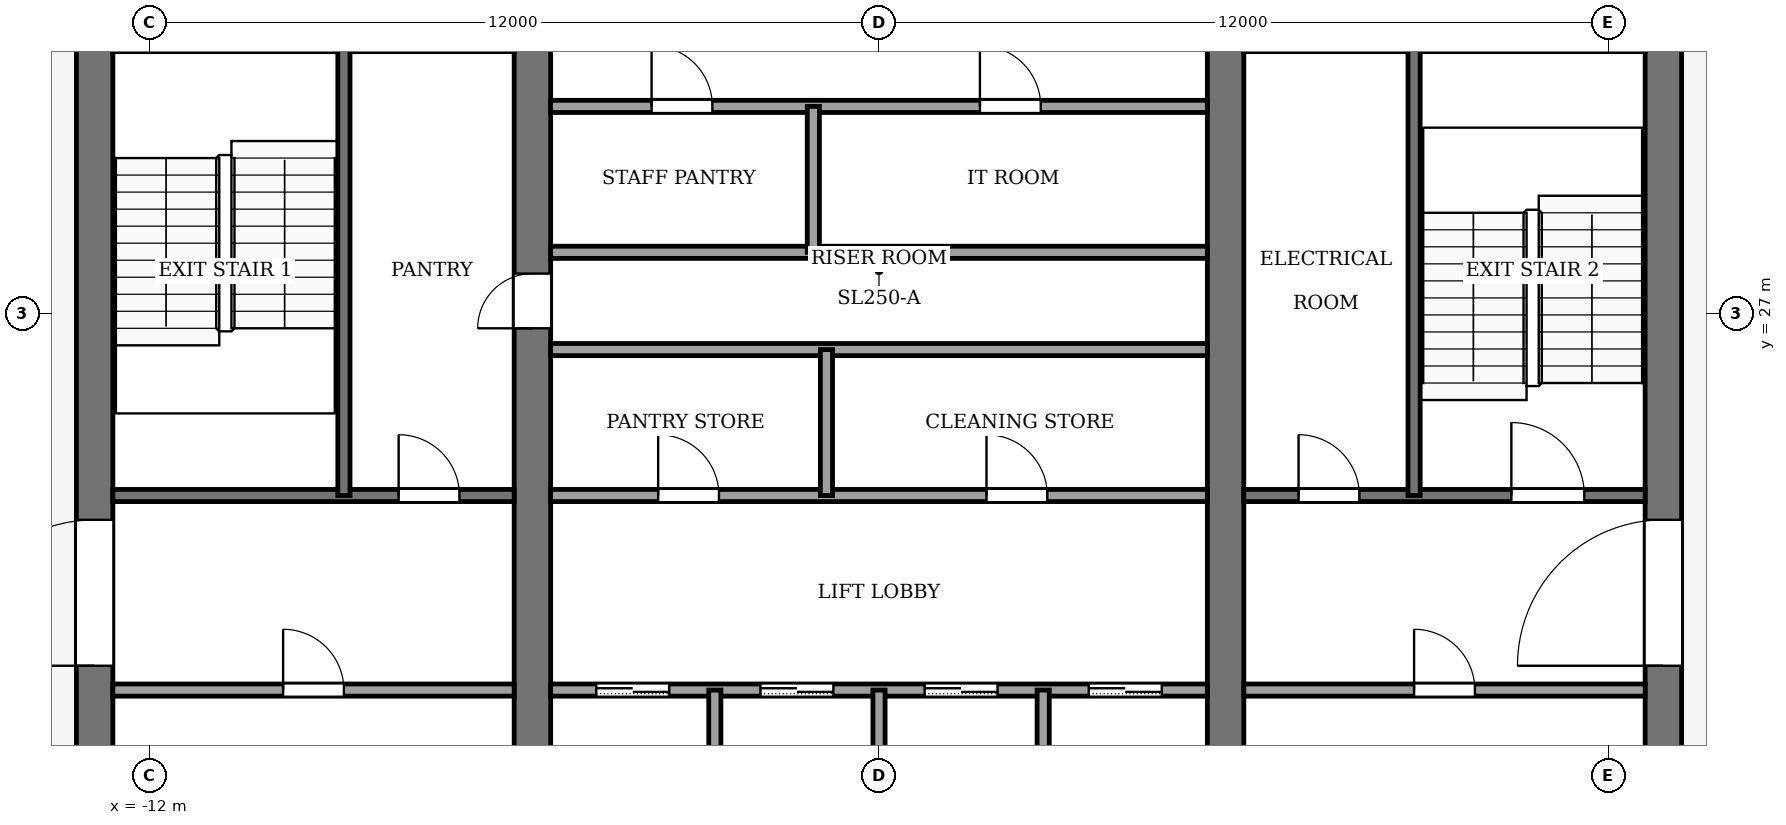
"""IFC4 building model, lengths in metres.
Left out: names, types, materials, properties, quantities, classifications, styles, units other than length and angle.
Written with IfcOpenShell. Run it as: python <this file> out.ifc"""

import sys

from ifc_helpers import new_model, si_unit, direction, frame, frame_2d, origin, place, context, subcontext, project, spatial, rectangle, extrude, element, fill, save


model = new_model("IFC4")
c1 = context("Model", 3, precision=1e-05, world=origin(), true_north=direction((0.0, 1.0)))
c2 = subcontext(c1, "Body", "Model", "MODEL_VIEW")
j1 = project(units=[si_unit("LENGTHUNIT", "METRE"), si_unit("PLANEANGLEUNIT", "RADIAN")], contexts=[c1])
p1 = place(None, origin())
s1 = spatial("IfcSite", under=j1, at=p1, CompositionType="ELEMENT")
p2 = place(p1, origin())
s2 = spatial("IfcBuilding", under=s1, at=p2, CompositionType="ELEMENT")
p3 = place(p2, frame((0.0, 0.0, 306.0)))
s3 = spatial("IfcBuildingStorey", under=s2, at=p3, CompositionType="ELEMENT", Elevation=306.0)
p4 = place(p3, frame((-12.9, 18.4, -0.13), z_axis=(0.0, 0.0, 1.0), x_axis=(0.0, 1.0, 0.0)))
e1 = element("IfcWall", 1, at=p4, inside=s3, PredefinedType="SHEAR", context=c2, shape_type="SweptSolid", body=[
    extrude(rectangle(XDim=19.2, YDim=0.6, at=frame_2d((9.6, 0.0))), origin(), (0.0, 0.0, 1.0), 4.0),
])
p5 = place(p4, frame((2.8, 0.0, 0.13)))
e2 = element("IfcOpeningElement", 2, at=p5, cuts=e1, PredefinedType="OPENING", context=c2, shape_type="SweptSolid", body=[
    extrude(rectangle(XDim=2.4, YDim=2.4, at=frame_2d((1.2, 1.2))), frame((0.0, 0.31, 0.0), z_axis=(0.0, -1.0, 0.0), x_axis=(1.0, 0.0, 0.0)), (0.0, 0.0, 1.0), 0.62),
])
p6 = place(p4, frame((13.4, 0.0, 0.13)))
e3 = element("IfcOpeningElement", 3, at=p6, cuts=e1, PredefinedType="OPENING", context=c2, shape_type="SweptSolid", body=[
    extrude(rectangle(XDim=1.4, YDim=2.2, at=frame_2d((0.7, 1.1))), frame((0.0, 0.31, 0.0), z_axis=(0.0, -1.0, 0.0), x_axis=(1.0, 0.0, 0.0)), (0.0, 0.0, 1.0), 0.62),
])
p7 = place(p3, frame((12.9, 18.4, -0.13), z_axis=(0.0, 0.0, 1.0), x_axis=(0.0, 1.0, 0.0)))
e4 = element("IfcWall", 4, at=p7, inside=s3, PredefinedType="SHEAR", context=c2, shape_type="SweptSolid", body=[
    extrude(rectangle(XDim=19.2, YDim=0.6, at=frame_2d((9.6, 0.0))), origin(), (0.0, 0.0, 1.0), 4.0),
])
p8 = place(p7, frame((2.8, 0.0, 0.13)))
e5 = element("IfcOpeningElement", 5, at=p8, cuts=e4, PredefinedType="OPENING", context=c2, shape_type="SweptSolid", body=[
    extrude(rectangle(XDim=2.4, YDim=2.4, at=frame_2d((1.2, 1.2))), frame((0.0, 0.31, 0.0), z_axis=(0.0, -1.0, 0.0), x_axis=(1.0, 0.0, 0.0)), (0.0, 0.0, 1.0), 0.62),
])
p9 = place(p7, frame((13.3, 0.0, 0.13)))
e6 = element("IfcOpeningElement", 6, at=p9, cuts=e4, PredefinedType="OPENING", context=c2, shape_type="SweptSolid", body=[
    extrude(rectangle(XDim=2.4, YDim=2.4, at=frame_2d((1.2, 1.2))), frame((0.0, 0.31, 0.0), z_axis=(0.0, -1.0, 0.0), x_axis=(1.0, 0.0, 0.0)), (0.0, 0.0, 1.0), 0.62),
])
p10 = place(p3, frame((-5.7, 18.4, -0.13), z_axis=(0.0, 0.0, 1.0), x_axis=(0.0, 1.0, 0.0)))
e7 = element("IfcWall", 7, at=p10, inside=s3, PredefinedType="SHEAR", context=c2, shape_type="SweptSolid", body=[
    extrude(rectangle(XDim=19.2, YDim=0.6, at=frame_2d((9.6, 0.0))), origin(), (0.0, 0.0, 1.0), 4.0),
])
p11 = place(p10, frame((8.35, 0.0, 0.13)))
e8 = element("IfcOpeningElement", 8, at=p11, cuts=e7, PredefinedType="OPENING", context=c2, shape_type="SweptSolid", body=[
    extrude(rectangle(XDim=0.9, YDim=2.1, at=frame_2d((0.45, 1.05))), frame((0.0, 0.31, 0.0), z_axis=(0.0, -1.0, 0.0), x_axis=(1.0, 0.0, 0.0)), (0.0, 0.0, 1.0), 0.62),
])
p12 = place(p3, frame((5.7, 18.4, -0.13), z_axis=(0.0, 0.0, 1.0), x_axis=(0.0, 1.0, 0.0)))
e9 = element("IfcWall", 9, at=p12, inside=s3, PredefinedType="SHEAR", context=c2, shape_type="SweptSolid", body=[
    extrude(rectangle(XDim=19.2, YDim=0.6, at=frame_2d((9.6, 0.0))), origin(), (0.0, 0.0, 1.0), 4.0),
])
p13 = place(p12, frame((13.3, 0.0, 0.13)))
e10 = element("IfcOpeningElement", 10, at=p13, cuts=e9, PredefinedType="OPENING", context=c2, shape_type="SweptSolid", body=[
    extrude(rectangle(XDim=2.4, YDim=2.4, at=frame_2d((1.2, 1.2))), frame((0.0, 0.31, 0.0), z_axis=(0.0, -1.0, 0.0), x_axis=(1.0, 0.0, 0.0)), (0.0, 0.0, 1.0), 0.62),
])
p14 = place(p3, frame((-12.6, 20.8, 0.0), z_axis=(0.0, 0.0, 1.0), x_axis=(1.0, 0.0, 0.0)))
e11 = element("IfcWall", 11, at=p14, inside=s3, PredefinedType="PARTITIONING", context=c2, shape_type="SweptSolid", body=[
    extrude(rectangle(XDim=6.6, YDim=0.2, at=frame_2d((3.3, 0.0))), origin(), (0.0, 0.0, 1.0), 3.87),
])
p15 = place(p14, frame((2.8, 0.0, 0.0)))
e12 = element("IfcOpeningElement", 12, at=p15, cuts=e11, PredefinedType="OPENING", context=c2, shape_type="SweptSolid", body=[
    extrude(rectangle(XDim=1.0, YDim=2.1, at=frame_2d((0.5, 1.05))), frame((0.0, 0.11, 0.0), z_axis=(0.0, -1.0, 0.0), x_axis=(1.0, 0.0, 0.0)), (0.0, 0.0, 1.0), 0.22),
])
p16 = place(p3, frame((-5.4, 20.8, 0.0), z_axis=(0.0, 0.0, 1.0), x_axis=(1.0, 0.0, 0.0)))
e13 = element("IfcWall", 13, at=p16, inside=s3, PredefinedType="PARTITIONING", context=c2, shape_type="SweptSolid", body=[
    extrude(rectangle(XDim=10.8, YDim=0.2, at=frame_2d((5.4, 0.0))), origin(), (0.0, 0.0, 1.0), 3.87),
])
p17 = place(p16, frame((0.75, 0.0, 0.0)))
e14 = element("IfcOpeningElement", 14, at=p17, cuts=e13, PredefinedType="OPENING", context=c2, shape_type="SweptSolid", body=[
    extrude(rectangle(XDim=1.2, YDim=2.2, at=frame_2d((0.6, 1.1))), frame((0.0, 0.11, 0.0), z_axis=(0.0, -1.0, 0.0), x_axis=(1.0, 0.0, 0.0)), (0.0, 0.0, 1.0), 0.22),
])
p18 = place(p16, frame((3.45, 0.0, 0.0)))
e15 = element("IfcOpeningElement", 15, at=p18, cuts=e13, PredefinedType="OPENING", context=c2, shape_type="SweptSolid", body=[
    extrude(rectangle(XDim=1.2, YDim=2.2, at=frame_2d((0.6, 1.1))), frame((0.0, 0.11, 0.0), z_axis=(0.0, -1.0, 0.0), x_axis=(1.0, 0.0, 0.0)), (0.0, 0.0, 1.0), 0.22),
])
p19 = place(p16, frame((6.15, 0.0, 0.0)))
e16 = element("IfcOpeningElement", 16, at=p19, cuts=e13, PredefinedType="OPENING", context=c2, shape_type="SweptSolid", body=[
    extrude(rectangle(XDim=1.2, YDim=2.2, at=frame_2d((0.6, 1.1))), frame((0.0, 0.11, 0.0), z_axis=(0.0, -1.0, 0.0), x_axis=(1.0, 0.0, 0.0)), (0.0, 0.0, 1.0), 0.22),
])
p20 = place(p16, frame((8.85, 0.0, 0.0)))
e17 = element("IfcOpeningElement", 17, at=p20, cuts=e13, PredefinedType="OPENING", context=c2, shape_type="SweptSolid", body=[
    extrude(rectangle(XDim=1.2, YDim=2.2, at=frame_2d((0.6, 1.1))), frame((0.0, 0.11, 0.0), z_axis=(0.0, -1.0, 0.0), x_axis=(1.0, 0.0, 0.0)), (0.0, 0.0, 1.0), 0.22),
])
p21 = place(p3, frame((6.0, 20.8, 0.0), z_axis=(0.0, 0.0, 1.0), x_axis=(1.0, 0.0, 0.0)))
e18 = element("IfcWall", 18, at=p21, inside=s3, PredefinedType="PARTITIONING", context=c2, shape_type="SweptSolid", body=[
    extrude(rectangle(XDim=6.6, YDim=0.2, at=frame_2d((3.3, 0.0))), origin(), (0.0, 0.0, 1.0), 3.87),
])
p22 = place(p21, frame((2.8, 0.0, 0.0)))
e19 = element("IfcOpeningElement", 19, at=p22, cuts=e18, PredefinedType="OPENING", context=c2, shape_type="SweptSolid", body=[
    extrude(rectangle(XDim=1.0, YDim=2.1, at=frame_2d((0.5, 1.05))), frame((0.0, 0.11, 0.0), z_axis=(0.0, -1.0, 0.0), x_axis=(1.0, 0.0, 0.0)), (0.0, 0.0, 1.0), 0.22),
])
p23 = place(p3, frame((-12.6, 24.0, 0.0), z_axis=(0.0, 0.0, 1.0), x_axis=(1.0, 0.0, 0.0)))
e20 = element("IfcWall", 20, at=p23, inside=s3, PredefinedType="PARTITIONING", context=c2, shape_type="SweptSolid", body=[
    extrude(rectangle(XDim=6.6, YDim=0.2, at=frame_2d((3.3, 0.0))), origin(), (0.0, 0.0, 1.0), 3.87),
])
p24 = place(p23, frame((4.7, 0.0, 0.0)))
e21 = element("IfcOpeningElement", 21, at=p24, cuts=e20, PredefinedType="OPENING", context=c2, shape_type="SweptSolid", body=[
    extrude(rectangle(XDim=1.0, YDim=2.1, at=frame_2d((0.5, 1.05))), frame((0.0, 0.11, 0.0), z_axis=(0.0, -1.0, 0.0), x_axis=(1.0, 0.0, 0.0)), (0.0, 0.0, 1.0), 0.22),
])
p25 = place(p3, frame((-5.4, 24.0, 0.0), z_axis=(0.0, 0.0, 1.0), x_axis=(1.0, 0.0, 0.0)))
e22 = element("IfcWall", 22, at=p25, inside=s3, PredefinedType="PARTITIONING", context=c2, shape_type="SweptSolid", body=[
    extrude(rectangle(XDim=10.8, YDim=0.2, at=frame_2d((5.4, 0.0))), origin(), (0.0, 0.0, 1.0), 3.87),
])
p26 = place(p25, frame((1.768, 0.0, 0.0)))
e23 = element("IfcOpeningElement", 23, at=p26, cuts=e22, PredefinedType="OPENING", context=c2, shape_type="SweptSolid", body=[
    extrude(rectangle(XDim=1.0, YDim=2.1, at=frame_2d((0.5, 1.05))), frame((0.0, 0.11, 0.0), z_axis=(0.0, -1.0, 0.0), x_axis=(1.0, 0.0, 0.0)), (0.0, 0.0, 1.0), 0.22),
])
p27 = place(p25, frame((7.168, 0.0, 0.0)))
e24 = element("IfcOpeningElement", 24, at=p27, cuts=e22, PredefinedType="OPENING", context=c2, shape_type="SweptSolid", body=[
    extrude(rectangle(XDim=1.0, YDim=2.1, at=frame_2d((0.5, 1.05))), frame((0.0, 0.11, 0.0), z_axis=(0.0, -1.0, 0.0), x_axis=(1.0, 0.0, 0.0)), (0.0, 0.0, 1.0), 0.22),
])
p28 = place(p3, frame((6.0, 24.0, 0.0), z_axis=(0.0, 0.0, 1.0), x_axis=(1.0, 0.0, 0.0)))
e25 = element("IfcWall", 25, at=p28, inside=s3, PredefinedType="PARTITIONING", context=c2, shape_type="SweptSolid", body=[
    extrude(rectangle(XDim=6.6, YDim=0.2, at=frame_2d((3.3, 0.0))), origin(), (0.0, 0.0, 1.0), 3.87),
])
p29 = place(p28, frame((0.9, 0.0, 0.0)))
e26 = element("IfcOpeningElement", 26, at=p29, cuts=e25, PredefinedType="OPENING", context=c2, shape_type="SweptSolid", body=[
    extrude(rectangle(XDim=1.0, YDim=2.1, at=frame_2d((0.5, 1.05))), frame((0.0, 0.11, 0.0), z_axis=(0.0, -1.0, 0.0), x_axis=(1.0, 0.0, 0.0)), (0.0, 0.0, 1.0), 0.22),
])
p30 = place(p28, frame((4.4, 0.0, 0.0)))
e27 = element("IfcOpeningElement", 27, at=p30, cuts=e25, PredefinedType="OPENING", context=c2, shape_type="SweptSolid", body=[
    extrude(rectangle(XDim=1.2, YDim=2.2, at=frame_2d((0.6, 1.1))), frame((0.0, 0.11, 0.0), z_axis=(0.0, -1.0, 0.0), x_axis=(1.0, 0.0, 0.0)), (0.0, 0.0, 1.0), 0.22),
])
for number, where, z_axis, x_axis in (
    (28, (-5.4, 26.4, 0.0), (0.0, 0.0, 1.0), (1.0, 0.0, 0.0)),
    (29, (-5.4, 28.0, 0.0), (0.0, 0.0, 1.0), (1.0, 0.0, 0.0)),
):
    element("IfcWall", number, at=place(p3, frame(where, z_axis=z_axis, x_axis=x_axis)), inside=s3, PredefinedType="PARTITIONING", context=c2, shape_type="SweptSolid", body=[
        extrude(rectangle(XDim=10.8, YDim=0.2, at=frame_2d((5.4, 0.0))), origin(), (0.0, 0.0, 1.0), 3.87),
    ])
p31 = place(p3, frame((-5.4, 30.4, 0.0), z_axis=(0.0, 0.0, 1.0), x_axis=(1.0, 0.0, 0.0)))
e30 = element("IfcWall", 30, at=p31, inside=s3, PredefinedType="PARTITIONING", context=c2, shape_type="SweptSolid", body=[
    extrude(rectangle(XDim=10.8, YDim=0.2, at=frame_2d((5.4, 0.0))), origin(), (0.0, 0.0, 1.0), 3.87),
])
p32 = place(p31, frame((1.66, 0.0, 0.0)))
e31 = element("IfcOpeningElement", 31, at=p32, cuts=e30, PredefinedType="OPENING", context=c2, shape_type="SweptSolid", body=[
    extrude(rectangle(XDim=1.0, YDim=2.1, at=frame_2d((0.5, 1.05))), frame((0.0, 0.11, 0.0), z_axis=(0.0, -1.0, 0.0), x_axis=(1.0, 0.0, 0.0)), (0.0, 0.0, 1.0), 0.22),
])
p33 = place(p31, frame((7.06, 0.0, 0.0)))
e32 = element("IfcOpeningElement", 32, at=p33, cuts=e30, PredefinedType="OPENING", context=c2, shape_type="SweptSolid", body=[
    extrude(rectangle(XDim=1.0, YDim=2.1, at=frame_2d((0.5, 1.05))), frame((0.0, 0.11, 0.0), z_axis=(0.0, -1.0, 0.0), x_axis=(1.0, 0.0, 0.0)), (0.0, 0.0, 1.0), 0.22),
])
p34 = place(p3, frame((-12.6, 31.4, 0.0), z_axis=(0.0, 0.0, 1.0), x_axis=(1.0, 0.0, 0.0)))
e33 = element("IfcWall", 33, at=p34, inside=s3, PredefinedType="PARTITIONING", context=c2, shape_type="SweptSolid", body=[
    extrude(rectangle(XDim=6.6, YDim=0.2, at=frame_2d((3.3, 0.0))), origin(), (0.0, 0.0, 1.0), 3.87),
])
p35 = place(p34, frame((1.0, 0.0, 0.0)))
e34 = element("IfcOpeningElement", 34, at=p35, cuts=e33, PredefinedType="OPENING", context=c2, shape_type="SweptSolid", body=[
    extrude(rectangle(XDim=1.2, YDim=2.2, at=frame_2d((0.6, 1.1))), frame((0.0, 0.11, 0.0), z_axis=(0.0, -1.0, 0.0), x_axis=(1.0, 0.0, 0.0)), (0.0, 0.0, 1.0), 0.22),
])
p36 = place(p3, frame((6.0, 31.4, 0.0), z_axis=(0.0, 0.0, 1.0), x_axis=(1.0, 0.0, 0.0)))
e35 = element("IfcWall", 35, at=p36, inside=s3, PredefinedType="PARTITIONING", context=c2, shape_type="SweptSolid", body=[
    extrude(rectangle(XDim=6.6, YDim=0.2, at=frame_2d((3.3, 0.0))), origin(), (0.0, 0.0, 1.0), 3.87),
])
p37 = place(p3, frame((-8.8, 24.0, 0.0), z_axis=(0.0, 0.0, 1.0), x_axis=(0.0, 1.0, 0.0)))
e36 = element("IfcWall", 36, at=p37, inside=s3, PredefinedType="PARTITIONING", context=c2, shape_type="SweptSolid", body=[
    extrude(rectangle(XDim=7.4, YDim=0.2, at=frame_2d((3.7, 0.0))), origin(), (0.0, 0.0, 1.0), 3.87),
])
p38 = place(p3, frame((-2.7, 18.4, 0.0), z_axis=(0.0, 0.0, 1.0), x_axis=(0.0, 1.0, 0.0)))
e37 = element("IfcWall", 37, at=p38, inside=s3, PredefinedType="PARTITIONING", context=c2, shape_type="SweptSolid", body=[
    extrude(rectangle(XDim=2.4, YDim=0.2, at=frame_2d((1.2, 0.0))), origin(), (0.0, 0.0, 1.0), 3.87),
])
for number, where, z_axis, x_axis in (
    (38, (-1.08, 28.0, 0.0), (0.0, 0.0, 1.0), (0.0, 1.0, 0.0)),
    (39, (-0.864, 24.0, 0.0), (0.0, 0.0, 1.0), (0.0, 1.0, 0.0)),
):
    element("IfcWall", number, at=place(p3, frame(where, z_axis=z_axis, x_axis=x_axis)), inside=s3, PredefinedType="PARTITIONING", context=c2, shape_type="SweptSolid", body=[
        extrude(rectangle(XDim=2.4, YDim=0.2, at=frame_2d((1.2, 0.0))), origin(), (0.0, 0.0, 1.0), 3.87),
    ])
for number, where, z_axis, x_axis in (
    (40, (0.0, 18.4, 0.0), (0.0, 0.0, 1.0), (0.0, 1.0, 0.0)),
    (41, (2.7, 18.4, 0.0), (0.0, 0.0, 1.0), (0.0, 1.0, 0.0)),
):
    element("IfcWall", number, at=place(p3, frame(where, z_axis=z_axis, x_axis=x_axis)), inside=s3, PredefinedType="PARTITIONING", context=c2, shape_type="SweptSolid", body=[
        extrude(rectangle(XDim=2.4, YDim=0.2, at=frame_2d((1.2, 0.0))), origin(), (0.0, 0.0, 1.0), 3.87),
    ])
p39 = place(p3, frame((8.8, 24.0, 0.0), z_axis=(0.0, 0.0, 1.0), x_axis=(0.0, 1.0, 0.0)))
e42 = element("IfcWall", 42, at=p39, inside=s3, PredefinedType="PARTITIONING", context=c2, shape_type="SweptSolid", body=[
    extrude(rectangle(XDim=7.4, YDim=0.2, at=frame_2d((3.7, 0.0))), origin(), (0.0, 0.0, 1.0), 3.87),
])
p40 = place(p17, origin())
e43 = element("IfcDoor", 43, at=p40, inside=s3, OperationType="SLIDING_TO_LEFT", PredefinedType="DOOR", context=c2, shape_type="SweptSolid", body=[
    extrude(rectangle(XDim=1.2, YDim=2.2, at=frame_2d((0.6, 1.1))), frame((0.0, 0.025, 0.0), z_axis=(0.0, -1.0, 0.0), x_axis=(1.0, 0.0, 0.0)), (0.0, 0.0, 1.0), 0.05),
])
fill(e14, e43)
p41 = place(p18, origin())
e44 = element("IfcDoor", 44, at=p41, inside=s3, OperationType="SLIDING_TO_LEFT", PredefinedType="DOOR", context=c2, shape_type="SweptSolid", body=[
    extrude(rectangle(XDim=1.2, YDim=2.2, at=frame_2d((0.6, 1.1))), frame((0.0, 0.025, 0.0), z_axis=(0.0, -1.0, 0.0), x_axis=(1.0, 0.0, 0.0)), (0.0, 0.0, 1.0), 0.05),
])
fill(e15, e44)
p42 = place(p19, origin())
e45 = element("IfcDoor", 45, at=p42, inside=s3, OperationType="SLIDING_TO_LEFT", PredefinedType="DOOR", context=c2, shape_type="SweptSolid", body=[
    extrude(rectangle(XDim=1.2, YDim=2.2, at=frame_2d((0.6, 1.1))), frame((0.0, 0.025, 0.0), z_axis=(0.0, -1.0, 0.0), x_axis=(1.0, 0.0, 0.0)), (0.0, 0.0, 1.0), 0.05),
])
fill(e16, e45)
p43 = place(p20, origin())
e46 = element("IfcDoor", 46, at=p43, inside=s3, OperationType="SLIDING_TO_LEFT", PredefinedType="DOOR", context=c2, shape_type="SweptSolid", body=[
    extrude(rectangle(XDim=1.2, YDim=2.2, at=frame_2d((0.6, 1.1))), frame((0.0, 0.025, 0.0), z_axis=(0.0, -1.0, 0.0), x_axis=(1.0, 0.0, 0.0)), (0.0, 0.0, 1.0), 0.05),
])
fill(e17, e46)
p44 = place(p26, origin())
e47 = element("IfcDoor", 47, at=p44, inside=s3, OperationType="SINGLE_SWING_LEFT", PredefinedType="DOOR", context=c2, shape_type="SweptSolid", body=[
    extrude(rectangle(XDim=1.0, YDim=2.1, at=frame_2d((0.5, 1.05))), frame((0.0, 0.025, 0.0), z_axis=(0.0, -1.0, 0.0), x_axis=(1.0, 0.0, 0.0)), (0.0, 0.0, 1.0), 0.05),
])
fill(e23, e47)
p45 = place(p27, origin())
e48 = element("IfcDoor", 48, at=p45, inside=s3, OperationType="SINGLE_SWING_RIGHT", PredefinedType="DOOR", context=c2, shape_type="SweptSolid", body=[
    extrude(rectangle(XDim=1.0, YDim=2.1, at=frame_2d((0.5, 1.05))), frame((0.0, 0.025, 0.0), z_axis=(0.0, -1.0, 0.0), x_axis=(1.0, 0.0, 0.0)), (0.0, 0.0, 1.0), 0.05),
])
fill(e24, e48)
p46 = place(p32, origin())
e49 = element("IfcDoor", 49, at=p46, inside=s3, OperationType="SINGLE_SWING_RIGHT", PredefinedType="DOOR", context=c2, shape_type="SweptSolid", body=[
    extrude(rectangle(XDim=1.0, YDim=2.1, at=frame_2d((0.5, 1.05))), frame((0.0, 0.025, 0.0), z_axis=(0.0, -1.0, 0.0), x_axis=(1.0, 0.0, 0.0)), (0.0, 0.0, 1.0), 0.05),
])
fill(e31, e49)
p47 = place(p33, origin())
e50 = element("IfcDoor", 50, at=p47, inside=s3, OperationType="SINGLE_SWING_LEFT", PredefinedType="DOOR", context=c2, shape_type="SweptSolid", body=[
    extrude(rectangle(XDim=1.0, YDim=2.1, at=frame_2d((0.5, 1.05))), frame((0.0, 0.025, 0.0), z_axis=(0.0, -1.0, 0.0), x_axis=(1.0, 0.0, 0.0)), (0.0, 0.0, 1.0), 0.05),
])
fill(e32, e50)
p48 = place(p15, origin())
e51 = element("IfcDoor", 51, at=p48, inside=s3, OperationType="SINGLE_SWING_LEFT", PredefinedType="DOOR", context=c2, shape_type="SweptSolid", body=[
    extrude(rectangle(XDim=1.0, YDim=2.1, at=frame_2d((0.5, 1.05))), frame((0.0, 0.025, 0.0), z_axis=(0.0, -1.0, 0.0), x_axis=(1.0, 0.0, 0.0)), (0.0, 0.0, 1.0), 0.05),
])
fill(e12, e51)
p49 = place(p22, origin())
e52 = element("IfcDoor", 52, at=p49, inside=s3, OperationType="SINGLE_SWING_RIGHT", PredefinedType="DOOR", context=c2, shape_type="SweptSolid", body=[
    extrude(rectangle(XDim=1.0, YDim=2.1, at=frame_2d((0.5, 1.05))), frame((0.0, 0.025, 0.0), z_axis=(0.0, -1.0, 0.0), x_axis=(1.0, 0.0, 0.0)), (0.0, 0.0, 1.0), 0.05),
])
fill(e19, e52)
p50 = place(p24, origin())
e53 = element("IfcDoor", 53, at=p50, inside=s3, OperationType="SINGLE_SWING_RIGHT", PredefinedType="DOOR", context=c2, shape_type="SweptSolid", body=[
    extrude(rectangle(XDim=1.0, YDim=2.1, at=frame_2d((0.5, 1.05))), frame((0.0, 0.025, 0.0), z_axis=(0.0, -1.0, 0.0), x_axis=(1.0, 0.0, 0.0)), (0.0, 0.0, 1.0), 0.05),
])
fill(e21, e53)
p51 = place(p29, origin())
e54 = element("IfcDoor", 54, at=p51, inside=s3, OperationType="SINGLE_SWING_LEFT", PredefinedType="DOOR", context=c2, shape_type="SweptSolid", body=[
    extrude(rectangle(XDim=1.0, YDim=2.1, at=frame_2d((0.5, 1.05))), frame((0.0, 0.025, 0.0), z_axis=(0.0, -1.0, 0.0), x_axis=(1.0, 0.0, 0.0)), (0.0, 0.0, 1.0), 0.05),
])
fill(e26, e54)
p52 = place(p11, origin())
e55 = element("IfcDoor", 55, at=p52, inside=s3, OperationType="SINGLE_SWING_RIGHT", PredefinedType="DOOR", context=c2, shape_type="SweptSolid", body=[
    extrude(rectangle(XDim=0.9, YDim=2.1, at=frame_2d((0.45, 1.05))), frame((0.0, 0.025, 0.0), z_axis=(0.0, -1.0, 0.0), x_axis=(1.0, 0.0, 0.0)), (0.0, 0.0, 1.0), 0.05),
])
fill(e8, e55)
p53 = place(p30, origin())
e56 = element("IfcDoor", 56, at=p53, inside=s3, OperationType="SINGLE_SWING_LEFT", PredefinedType="DOOR", context=c2, shape_type="SweptSolid", body=[
    extrude(rectangle(XDim=1.2, YDim=2.2, at=frame_2d((0.6, 1.1))), frame((0.0, 0.025, 0.0), z_axis=(0.0, -1.0, 0.0), x_axis=(1.0, 0.0, 0.0)), (0.0, 0.0, 1.0), 0.05),
])
fill(e27, e56)
p54 = place(p5, origin())
e57 = element("IfcDoor", 57, at=p54, inside=s3, OperationType="DOUBLE_DOOR_SINGLE_SWING", PredefinedType="DOOR", context=c2, shape_type="SweptSolid", body=[
    extrude(rectangle(XDim=2.4, YDim=2.4, at=frame_2d((1.2, 1.2))), frame((0.0, 0.025, 0.0), z_axis=(0.0, -1.0, 0.0), x_axis=(1.0, 0.0, 0.0)), (0.0, 0.0, 1.0), 0.05),
])
fill(e2, e57)
p55 = place(p8, origin())
e58 = element("IfcDoor", 58, at=p55, inside=s3, OperationType="DOUBLE_DOOR_SINGLE_SWING", PredefinedType="DOOR", context=c2, shape_type="SweptSolid", body=[
    extrude(rectangle(XDim=2.4, YDim=2.4, at=frame_2d((1.2, 1.2))), frame((0.0, 0.025, 0.0), z_axis=(0.0, -1.0, 0.0), x_axis=(1.0, 0.0, 0.0)), (0.0, 0.0, 1.0), 0.05),
])
fill(e5, e58)
save(model, sys.argv[1])
